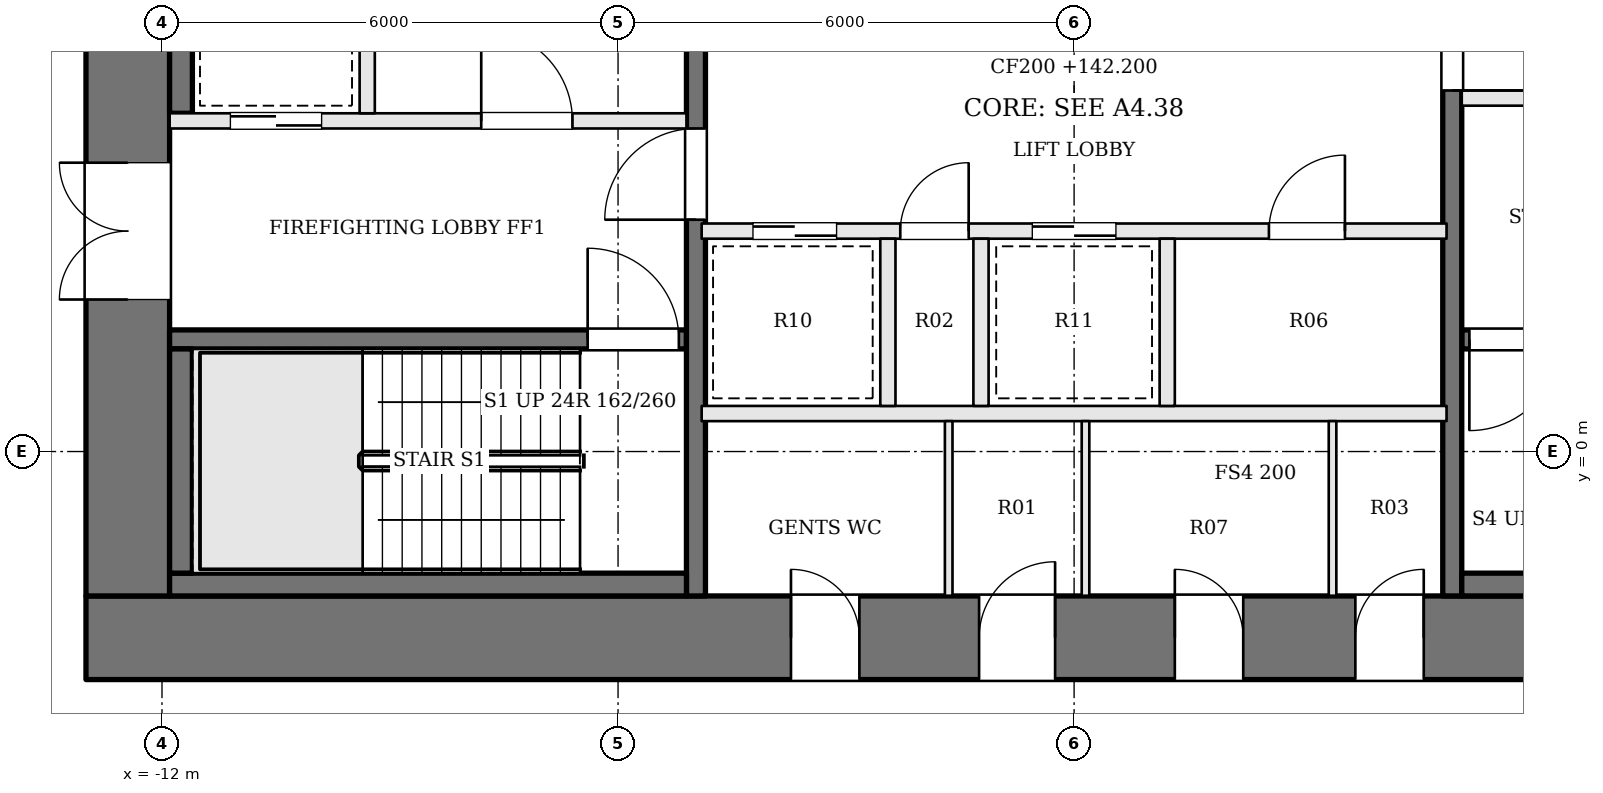
"""IFC4 building model, lengths in metres.
Left out: names, types, materials, properties, quantities, classifications, styles, units other than length and angle.
Written with IfcOpenShell. Run it as: python <this file> out.ifc"""

import sys

from ifc_helpers import new_model, si_unit, direction, frame, frame_2d, origin, place, context, subcontext, project, spatial, rectangle, extrude, element, fill, save


model = new_model("IFC4")
c1 = context("Model", 3, precision=1e-05, world=origin(), true_north=direction((0.0, 1.0)))
c2 = subcontext(c1, "Body", "Model", "MODEL_VIEW")
j1 = project(units=[si_unit("LENGTHUNIT", "METRE"), si_unit("PLANEANGLEUNIT", "RADIAN")], contexts=[c1])
p1 = place(None, origin())
s1 = spatial("IfcSite", under=j1, at=p1, CompositionType="ELEMENT")
p2 = place(p1, origin())
s2 = spatial("IfcBuilding", under=s1, at=p2, CompositionType="ELEMENT")
p3 = place(p2, frame((0.0, 0.0, 142.2)))
s3 = spatial("IfcBuildingStorey", under=s2, at=p3, CompositionType="ELEMENT", Elevation=142.2)
p4 = place(p3, frame((-13.0, -2.45, 0.0), z_axis=(0.0, 0.0, 1.0), x_axis=(1.0, 0.0, 0.0)))
e1 = element("IfcWall", 1, at=p4, inside=s3, PredefinedType="SHEAR", context=c2, shape_type="SweptSolid", body=[
    extrude(rectangle(XDim=26.0, YDim=1.1, at=frame_2d((13.0, 0.0))), origin(), (0.0, 0.0, 1.0), 3.9),
])
p5 = place(p4, frame((9.275, 0.0, 0.0)))
e2 = element("IfcOpeningElement", 2, at=p5, cuts=e1, PredefinedType="OPENING", context=c2, shape_type="SweptSolid", body=[
    extrude(rectangle(XDim=0.9, YDim=2.1, at=frame_2d((0.45, 1.05))), frame((0.0, 0.56, 0.0), z_axis=(0.0, -1.0, 0.0), x_axis=(1.0, 0.0, 0.0)), (0.0, 0.0, 1.0), 1.12),
])
p6 = place(p4, frame((11.75, 0.0, 0.0)))
e3 = element("IfcOpeningElement", 3, at=p6, cuts=e1, PredefinedType="OPENING", context=c2, shape_type="SweptSolid", body=[
    extrude(rectangle(XDim=1.0, YDim=2.1, at=frame_2d((0.5, 1.05))), frame((0.0, 0.56, 0.0), z_axis=(0.0, -1.0, 0.0), x_axis=(1.0, 0.0, 0.0)), (0.0, 0.0, 1.0), 1.12),
])
p7 = place(p4, frame((14.325, 0.0, 0.0)))
e4 = element("IfcOpeningElement", 4, at=p7, cuts=e1, PredefinedType="OPENING", context=c2, shape_type="SweptSolid", body=[
    extrude(rectangle(XDim=0.9, YDim=2.1, at=frame_2d((0.45, 1.05))), frame((0.0, 0.56, 0.0), z_axis=(0.0, -1.0, 0.0), x_axis=(1.0, 0.0, 0.0)), (0.0, 0.0, 1.0), 1.12),
])
p8 = place(p4, frame((16.7, 0.0, 0.0)))
e5 = element("IfcOpeningElement", 5, at=p8, cuts=e1, PredefinedType="OPENING", context=c2, shape_type="SweptSolid", body=[
    extrude(rectangle(XDim=0.9, YDim=2.1, at=frame_2d((0.45, 1.05))), frame((0.0, 0.56, 0.0), z_axis=(0.0, -1.0, 0.0), x_axis=(1.0, 0.0, 0.0)), (0.0, 0.0, 1.0), 1.12),
])
p9 = place(p3, frame((-12.45, -1.9, 0.0), z_axis=(0.0, 0.0, 1.0), x_axis=(0.0, 1.0, 0.0)))
e6 = element("IfcWall", 6, at=p9, inside=s3, PredefinedType="SHEAR", context=c2, shape_type="SweptSolid", body=[
    extrude(rectangle(XDim=12.8, YDim=1.1, at=frame_2d((6.4, 0.0))), origin(), (0.0, 0.0, 1.0), 3.9),
])
p10 = place(p9, frame((3.9, 0.0, 0.0)))
e7 = element("IfcOpeningElement", 7, at=p10, cuts=e6, PredefinedType="OPENING", context=c2, shape_type="SweptSolid", body=[
    extrude(rectangle(XDim=1.8, YDim=2.1, at=frame_2d((0.9, 1.05))), frame((0.0, 0.56, 0.0), z_axis=(0.0, -1.0, 0.0), x_axis=(1.0, 0.0, 0.0)), (0.0, 0.0, 1.0), 1.12),
])
p11 = place(p3, frame((-11.9, 1.475, 0.0), z_axis=(0.0, 0.0, 1.0), x_axis=(1.0, 0.0, 0.0)))
e8 = element("IfcWall", 8, at=p11, inside=s3, PredefinedType="SOLIDWALL", context=c2, shape_type="SweptSolid", body=[
    extrude(rectangle(XDim=6.8, YDim=0.25, at=frame_2d((3.4, 0.0))), origin(), (0.0, 0.0, 1.0), 3.7),
])
p12 = place(p11, frame((5.5, 0.0, 0.0)))
e9 = element("IfcOpeningElement", 9, at=p12, cuts=e8, PredefinedType="OPENING", context=c2, shape_type="SweptSolid", body=[
    extrude(rectangle(XDim=1.2, YDim=2.1, at=frame_2d((0.6, 1.05))), frame((0.0, 0.135, 0.0), z_axis=(0.0, -1.0, 0.0), x_axis=(1.0, 0.0, 0.0)), (0.0, 0.0, 1.0), 0.27),
])
p13 = place(p3, frame((-11.9, 4.35, 0.0), z_axis=(0.0, 0.0, 1.0), x_axis=(1.0, 0.0, 0.0)))
e10 = element("IfcWall", 10, at=p13, inside=s3, PredefinedType="SOLIDWALL", context=c2, shape_type="SweptSolid", body=[
    extrude(rectangle(XDim=6.8, YDim=0.2, at=frame_2d((3.4, 0.0))), origin(), (0.0, 0.0, 1.0), 3.7),
])
p14 = place(p13, frame((4.1, 0.0, 0.0)))
e11 = element("IfcOpeningElement", 11, at=p14, cuts=e10, PredefinedType="OPENING", context=c2, shape_type="SweptSolid", body=[
    extrude(rectangle(XDim=1.2, YDim=2.1, at=frame_2d((0.6, 1.05))), frame((0.0, 0.11, 0.0), z_axis=(0.0, -1.0, 0.0), x_axis=(1.0, 0.0, 0.0)), (0.0, 0.0, 1.0), 0.22),
])
p15 = place(p13, frame((0.8, 0.0, 0.0)))
e12 = element("IfcOpeningElement", 12, at=p15, cuts=e10, PredefinedType="OPENING", context=c2, shape_type="SweptSolid", body=[
    extrude(rectangle(XDim=1.2, YDim=2.1, at=frame_2d((0.6, 1.05))), frame((0.0, 0.11, 0.0), z_axis=(0.0, -1.0, 0.0), x_axis=(1.0, 0.0, 0.0)), (0.0, 0.0, 1.0), 0.22),
])
p16 = place(p3, frame((11.9, 4.65, 0.0), z_axis=(0.0, 0.0, 1.0), x_axis=(-1.0, 0.0, 0.0)))
e13 = element("IfcWall", 13, at=p16, inside=s3, PredefinedType="SOLIDWALL", context=c2, shape_type="SweptSolid", body=[
    extrude(rectangle(XDim=6.8, YDim=0.2, at=frame_2d((3.4, 0.0))), origin(), (0.0, 0.0, 1.0), 3.7),
])
p17 = place(p16, frame((4.1, 0.0, 0.0)))
e14 = element("IfcOpeningElement", 14, at=p17, cuts=e13, PredefinedType="OPENING", context=c2, shape_type="SweptSolid", body=[
    extrude(rectangle(XDim=1.2, YDim=2.1, at=frame_2d((0.6, 1.05))), frame((0.0, 0.11, 0.0), z_axis=(0.0, -1.0, 0.0), x_axis=(1.0, 0.0, 0.0)), (0.0, 0.0, 1.0), 0.22),
])
p18 = place(p16, frame((0.8, 0.0, 0.0)))
e15 = element("IfcOpeningElement", 15, at=p18, cuts=e13, PredefinedType="OPENING", context=c2, shape_type="SweptSolid", body=[
    extrude(rectangle(XDim=1.2, YDim=2.1, at=frame_2d((0.6, 1.05))), frame((0.0, 0.11, 0.0), z_axis=(0.0, -1.0, 0.0), x_axis=(1.0, 0.0, 0.0)), (0.0, 0.0, 1.0), 0.22),
])
p19 = place(p3, frame((11.9, 1.475, 0.0), z_axis=(0.0, 0.0, 1.0), x_axis=(-1.0, 0.0, 0.0)))
e16 = element("IfcWall", 16, at=p19, inside=s3, PredefinedType="SOLIDWALL", context=c2, shape_type="SweptSolid", body=[
    extrude(rectangle(XDim=6.8, YDim=0.25, at=frame_2d((3.4, 0.0))), origin(), (0.0, 0.0, 1.0), 3.7),
])
p20 = place(p19, frame((5.5, 0.0, 0.0)))
e17 = element("IfcOpeningElement", 17, at=p20, cuts=e16, PredefinedType="OPENING", context=c2, shape_type="SweptSolid", body=[
    extrude(rectangle(XDim=1.2, YDim=2.1, at=frame_2d((0.6, 1.05))), frame((0.0, 0.135, 0.0), z_axis=(0.0, -1.0, 0.0), x_axis=(1.0, 0.0, 0.0)), (0.0, 0.0, 1.0), 0.27),
])
p21 = place(p3, frame((-9.3, 4.45, 0.0), z_axis=(0.0, 0.0, 1.0), x_axis=(0.0, 1.0, 0.0)))
e18 = element("IfcWall", 18, at=p21, inside=s3, PredefinedType="SOLIDWALL", context=c2, shape_type="SweptSolid", body=[
    extrude(rectangle(XDim=3.0, YDim=0.2, at=frame_2d((1.5, 0.0))), origin(), (0.0, 0.0, 1.0), 3.7),
])
p22 = place(p3, frame((-4.975, -1.9, 0.0), z_axis=(0.0, 0.0, 1.0), x_axis=(0.0, 1.0, 0.0)))
e19 = element("IfcWall", 19, at=p22, inside=s3, PredefinedType="SOLIDWALL", context=c2, shape_type="SweptSolid", body=[
    extrude(rectangle(XDim=12.8, YDim=0.25, at=frame_2d((6.4, 0.0))), origin(), (0.0, 0.0, 1.0), 3.7),
])
p23 = place(p22, frame((4.95, 0.0, 0.0)))
e20 = element("IfcOpeningElement", 20, at=p23, cuts=e19, PredefinedType="OPENING", context=c2, shape_type="SweptSolid", body=[
    extrude(rectangle(XDim=1.2, YDim=2.1, at=frame_2d((0.6, 1.05))), frame((0.0, 0.135, 0.0), z_axis=(0.0, -1.0, 0.0), x_axis=(1.0, 0.0, 0.0)), (0.0, 0.0, 1.0), 0.27),
])
p24 = place(p3, frame((4.975, 10.9, 0.0), z_axis=(0.0, 0.0, 1.0), x_axis=(0.0, -1.0, 0.0)))
e21 = element("IfcWall", 21, at=p24, inside=s3, PredefinedType="SOLIDWALL", context=c2, shape_type="SweptSolid", body=[
    extrude(rectangle(XDim=12.8, YDim=0.25, at=frame_2d((6.4, 0.0))), origin(), (0.0, 0.0, 1.0), 3.7),
])
p25 = place(p24, frame((4.95, 0.0, 0.0)))
e22 = element("IfcOpeningElement", 22, at=p25, cuts=e21, PredefinedType="OPENING", context=c2, shape_type="SweptSolid", body=[
    extrude(rectangle(XDim=1.2, YDim=2.1, at=frame_2d((0.6, 1.05))), frame((0.0, 0.135, 0.0), z_axis=(0.0, -1.0, 0.0), x_axis=(1.0, 0.0, 0.0)), (0.0, 0.0, 1.0), 0.27),
])
p26 = place(p3, frame((-11.9, -1.75, 0.0), z_axis=(0.0, 0.0, 1.0), x_axis=(1.0, 0.0, 0.0)))
e23 = element("IfcWall", 23, at=p26, inside=s3, PredefinedType="SOLIDWALL", context=c2, shape_type="SweptSolid", body=[
    extrude(rectangle(XDim=6.8, YDim=0.3, at=frame_2d((3.4, 0.0))), origin(), (0.0, 0.0, 1.0), 3.7),
])
p27 = place(p3, frame((-11.75, -1.6, 0.0), z_axis=(0.0, 0.0, 1.0), x_axis=(0.0, 1.0, 0.0)))
e24 = element("IfcWall", 24, at=p27, inside=s3, PredefinedType="SOLIDWALL", context=c2, shape_type="SweptSolid", body=[
    extrude(rectangle(XDim=2.95, YDim=0.3, at=frame_2d((1.475, 0.0))), origin(), (0.0, 0.0, 1.0), 3.7),
])
p28 = place(p3, frame((-11.75, 4.45, 0.0), z_axis=(0.0, 0.0, 1.0), x_axis=(0.0, 1.0, 0.0)))
e25 = element("IfcWall", 25, at=p28, inside=s3, PredefinedType="SOLIDWALL", context=c2, shape_type="SweptSolid", body=[
    extrude(rectangle(XDim=3.0, YDim=0.3, at=frame_2d((1.5, 0.0))), origin(), (0.0, 0.0, 1.0), 3.7),
])
p29 = place(p3, frame((11.9, -1.75, 0.0), z_axis=(0.0, 0.0, 1.0), x_axis=(-1.0, 0.0, 0.0)))
e26 = element("IfcWall", 26, at=p29, inside=s3, PredefinedType="SOLIDWALL", context=c2, shape_type="SweptSolid", body=[
    extrude(rectangle(XDim=6.8, YDim=0.3, at=frame_2d((3.4, 0.0))), origin(), (0.0, 0.0, 1.0), 3.7),
])
p30 = place(p3, frame((-4.9, 0.5, 0.0), z_axis=(0.0, 0.0, 1.0), x_axis=(1.0, 0.0, 0.0)))
e27 = element("IfcWall", 27, at=p30, inside=s3, PredefinedType="SOLIDWALL", context=c2, shape_type="SweptSolid", body=[
    extrude(rectangle(XDim=9.8, YDim=0.2, at=frame_2d((4.9, 0.0))), origin(), (0.0, 0.0, 1.0), 3.7),
])
p31 = place(p3, frame((-4.9, 2.9, 0.0), z_axis=(0.0, 0.0, 1.0), x_axis=(1.0, 0.0, 0.0)))
e28 = element("IfcWall", 28, at=p31, inside=s3, PredefinedType="SOLIDWALL", context=c2, shape_type="SweptSolid", body=[
    extrude(rectangle(XDim=9.8, YDim=0.2, at=frame_2d((4.9, 0.0))), origin(), (0.0, 0.0, 1.0), 3.7),
])
p32 = place(p31, frame((0.675, 0.0, 0.0)))
e29 = element("IfcOpeningElement", 29, at=p32, cuts=e28, PredefinedType="OPENING", context=c2, shape_type="SweptSolid", body=[
    extrude(rectangle(XDim=1.1, YDim=2.1, at=frame_2d((0.55, 1.05))), frame((0.0, 0.11, 0.0), z_axis=(0.0, -1.0, 0.0), x_axis=(1.0, 0.0, 0.0)), (0.0, 0.0, 1.0), 0.22),
])
p33 = place(p31, frame((2.613, 0.0, 0.0)))
e30 = element("IfcOpeningElement", 30, at=p33, cuts=e28, PredefinedType="OPENING", context=c2, shape_type="SweptSolid", body=[
    extrude(rectangle(XDim=0.9, YDim=2.1, at=frame_2d((0.45, 1.05))), frame((0.0, 0.11, 0.0), z_axis=(0.0, -1.0, 0.0), x_axis=(1.0, 0.0, 0.0)), (0.0, 0.0, 1.0), 0.22),
])
p34 = place(p31, frame((4.35, 0.0, 0.0)))
e31 = element("IfcOpeningElement", 31, at=p34, cuts=e28, PredefinedType="OPENING", context=c2, shape_type="SweptSolid", body=[
    extrude(rectangle(XDim=1.1, YDim=2.1, at=frame_2d((0.55, 1.05))), frame((0.0, 0.11, 0.0), z_axis=(0.0, -1.0, 0.0), x_axis=(1.0, 0.0, 0.0)), (0.0, 0.0, 1.0), 0.22),
])
p35 = place(p31, frame((7.463, 0.0, 0.0)))
e32 = element("IfcOpeningElement", 32, at=p35, cuts=e28, PredefinedType="OPENING", context=c2, shape_type="SweptSolid", body=[
    extrude(rectangle(XDim=1.0, YDim=2.1, at=frame_2d((0.5, 1.05))), frame((0.0, 0.11, 0.0), z_axis=(0.0, -1.0, 0.0), x_axis=(1.0, 0.0, 0.0)), (0.0, 0.0, 1.0), 0.22),
])
for number, where, z_axis, x_axis in (
    (33, (-2.45, 0.6, 0.0), (0.0, 0.0, 1.0), (0.0, 1.0, 0.0)),
    (34, (-1.225, 0.6, 0.0), (0.0, 0.0, 1.0), (0.0, 1.0, 0.0)),
    (35, (1.225, 0.6, 0.0), (0.0, 0.0, 1.0), (0.0, 1.0, 0.0)),
):
    element("IfcWall", number, at=place(p3, frame(where, z_axis=z_axis, x_axis=x_axis)), inside=s3, PredefinedType="SOLIDWALL", context=c2, shape_type="SweptSolid", body=[
        extrude(rectangle(XDim=2.2, YDim=0.2, at=frame_2d((1.1, 0.0))), origin(), (0.0, 0.0, 1.0), 3.7),
    ])
for number, where, z_axis, x_axis in (
    (36, (-1.65, -1.9, 0.0), (0.0, 0.0, 1.0), (0.0, 1.0, 0.0)),
    (37, (0.15, -1.9, 0.0), (0.0, 0.0, 1.0), (0.0, 1.0, 0.0)),
    (38, (3.4, -1.9, 0.0), (0.0, 0.0, 1.0), (0.0, 1.0, 0.0)),
):
    element("IfcWall", number, at=place(p3, frame(where, z_axis=z_axis, x_axis=x_axis)), inside=s3, PredefinedType="PARTITIONING", context=c2, shape_type="SweptSolid", body=[
        extrude(rectangle(XDim=2.3, YDim=0.1, at=frame_2d((1.15, 0.0))), origin(), (0.0, 0.0, 1.0), 3.7),
    ])
p36 = place(p10, origin())
e39 = element("IfcDoor", 39, at=p36, inside=s3, OperationType="DOUBLE_DOOR_SINGLE_SWING", PredefinedType="DOOR", context=c2, shape_type="SweptSolid", body=[
    extrude(rectangle(XDim=1.8, YDim=2.1, at=frame_2d((0.9, 1.05))), frame((0.0, 0.025, 0.0), z_axis=(0.0, -1.0, 0.0), x_axis=(1.0, 0.0, 0.0)), (0.0, 0.0, 1.0), 0.05),
])
fill(e7, e39)
p37 = place(p23, origin())
e40 = element("IfcDoor", 40, at=p37, inside=s3, OperationType="SINGLE_SWING_LEFT", PredefinedType="DOOR", context=c2, shape_type="SweptSolid", body=[
    extrude(rectangle(XDim=1.2, YDim=2.1, at=frame_2d((0.6, 1.05))), frame((0.0, 0.025, 0.0), z_axis=(0.0, -1.0, 0.0), x_axis=(1.0, 0.0, 0.0)), (0.0, 0.0, 1.0), 0.05),
])
fill(e20, e40)
p38 = place(p25, origin())
e41 = element("IfcDoor", 41, at=p38, inside=s3, OperationType="SINGLE_SWING_RIGHT", PredefinedType="DOOR", context=c2, shape_type="SweptSolid", body=[
    extrude(rectangle(XDim=1.2, YDim=2.1, at=frame_2d((0.6, 1.05))), frame((0.0, 0.025, 0.0), z_axis=(0.0, -1.0, 0.0), x_axis=(1.0, 0.0, 0.0)), (0.0, 0.0, 1.0), 0.05),
])
fill(e22, e41)
p39 = place(p14, origin())
e42 = element("IfcDoor", 42, at=p39, inside=s3, OperationType="SINGLE_SWING_LEFT", PredefinedType="DOOR", context=c2, shape_type="SweptSolid", body=[
    extrude(rectangle(XDim=1.2, YDim=2.1, at=frame_2d((0.6, 1.05))), frame((0.0, 0.025, 0.0), z_axis=(0.0, -1.0, 0.0), x_axis=(1.0, 0.0, 0.0)), (0.0, 0.0, 1.0), 0.05),
])
fill(e11, e42)
p40 = place(p12, origin())
e43 = element("IfcDoor", 43, at=p40, inside=s3, OperationType="SINGLE_SWING_LEFT", PredefinedType="DOOR", context=c2, shape_type="SweptSolid", body=[
    extrude(rectangle(XDim=1.2, YDim=2.1, at=frame_2d((0.6, 1.05))), frame((0.0, 0.025, 0.0), z_axis=(0.0, -1.0, 0.0), x_axis=(1.0, 0.0, 0.0)), (0.0, 0.0, 1.0), 0.05),
])
fill(e9, e43)
p41 = place(p20, origin())
e44 = element("IfcDoor", 44, at=p41, inside=s3, OperationType="SINGLE_SWING_RIGHT", PredefinedType="DOOR", context=c2, shape_type="SweptSolid", body=[
    extrude(rectangle(XDim=1.2, YDim=2.1, at=frame_2d((0.6, 1.05))), frame((0.0, 0.025, 0.0), z_axis=(0.0, -1.0, 0.0), x_axis=(1.0, 0.0, 0.0)), (0.0, 0.0, 1.0), 0.05),
])
fill(e17, e44)
p42 = place(p15, origin())
e45 = element("IfcDoor", 45, at=p42, inside=s3, OperationType="SLIDING_TO_RIGHT", PredefinedType="DOOR", context=c2, shape_type="SweptSolid", body=[
    extrude(rectangle(XDim=1.2, YDim=2.1, at=frame_2d((0.6, 1.05))), frame((0.0, 0.025, 0.0), z_axis=(0.0, -1.0, 0.0), x_axis=(1.0, 0.0, 0.0)), (0.0, 0.0, 1.0), 0.05),
])
fill(e12, e45)
p43 = place(p32, origin())
e46 = element("IfcDoor", 46, at=p43, inside=s3, OperationType="SLIDING_TO_RIGHT", PredefinedType="DOOR", context=c2, shape_type="SweptSolid", body=[
    extrude(rectangle(XDim=1.1, YDim=2.1, at=frame_2d((0.55, 1.05))), frame((0.0, 0.025, 0.0), z_axis=(0.0, -1.0, 0.0), x_axis=(1.0, 0.0, 0.0)), (0.0, 0.0, 1.0), 0.05),
])
fill(e29, e46)
p44 = place(p33, origin())
e47 = element("IfcDoor", 47, at=p44, inside=s3, OperationType="SINGLE_SWING_RIGHT", PredefinedType="DOOR", context=c2, shape_type="SweptSolid", body=[
    extrude(rectangle(XDim=0.9, YDim=2.1, at=frame_2d((0.45, 1.05))), frame((0.0, 0.025, 0.0), z_axis=(0.0, -1.0, 0.0), x_axis=(1.0, 0.0, 0.0)), (0.0, 0.0, 1.0), 0.05),
])
fill(e30, e47)
p45 = place(p34, origin())
e48 = element("IfcDoor", 48, at=p45, inside=s3, OperationType="SLIDING_TO_LEFT", PredefinedType="DOOR", context=c2, shape_type="SweptSolid", body=[
    extrude(rectangle(XDim=1.1, YDim=2.1, at=frame_2d((0.55, 1.05))), frame((0.0, 0.025, 0.0), z_axis=(0.0, -1.0, 0.0), x_axis=(1.0, 0.0, 0.0)), (0.0, 0.0, 1.0), 0.05),
])
fill(e31, e48)
p46 = place(p35, origin())
e49 = element("IfcDoor", 49, at=p46, inside=s3, OperationType="SINGLE_SWING_RIGHT", PredefinedType="DOOR", context=c2, shape_type="SweptSolid", body=[
    extrude(rectangle(XDim=1.0, YDim=2.1, at=frame_2d((0.5, 1.05))), frame((0.0, 0.025, 0.0), z_axis=(0.0, -1.0, 0.0), x_axis=(1.0, 0.0, 0.0)), (0.0, 0.0, 1.0), 0.05),
])
fill(e32, e49)
p47 = place(p5, origin())
e50 = element("IfcDoor", 50, at=p47, inside=s3, OperationType="SINGLE_SWING_LEFT", PredefinedType="DOOR", context=c2, shape_type="SweptSolid", body=[
    extrude(rectangle(XDim=0.9, YDim=2.1, at=frame_2d((0.45, 1.05))), frame((0.0, 0.025, 0.0), z_axis=(0.0, -1.0, 0.0), x_axis=(1.0, 0.0, 0.0)), (0.0, 0.0, 1.0), 0.05),
])
fill(e2, e50)
p48 = place(p6, origin())
e51 = element("IfcDoor", 51, at=p48, inside=s3, OperationType="SINGLE_SWING_RIGHT", PredefinedType="DOOR", context=c2, shape_type="SweptSolid", body=[
    extrude(rectangle(XDim=1.0, YDim=2.1, at=frame_2d((0.5, 1.05))), frame((0.0, 0.025, 0.0), z_axis=(0.0, -1.0, 0.0), x_axis=(1.0, 0.0, 0.0)), (0.0, 0.0, 1.0), 0.05),
])
fill(e3, e51)
p49 = place(p7, origin())
e52 = element("IfcDoor", 52, at=p49, inside=s3, OperationType="SINGLE_SWING_LEFT", PredefinedType="DOOR", context=c2, shape_type="SweptSolid", body=[
    extrude(rectangle(XDim=0.9, YDim=2.1, at=frame_2d((0.45, 1.05))), frame((0.0, 0.025, 0.0), z_axis=(0.0, -1.0, 0.0), x_axis=(1.0, 0.0, 0.0)), (0.0, 0.0, 1.0), 0.05),
])
fill(e4, e52)
p50 = place(p8, origin())
e53 = element("IfcDoor", 53, at=p50, inside=s3, OperationType="SINGLE_SWING_RIGHT", PredefinedType="DOOR", context=c2, shape_type="SweptSolid", body=[
    extrude(rectangle(XDim=0.9, YDim=2.1, at=frame_2d((0.45, 1.05))), frame((0.0, 0.025, 0.0), z_axis=(0.0, -1.0, 0.0), x_axis=(1.0, 0.0, 0.0)), (0.0, 0.0, 1.0), 0.05),
])
fill(e5, e53)
save(model, sys.argv[1])
